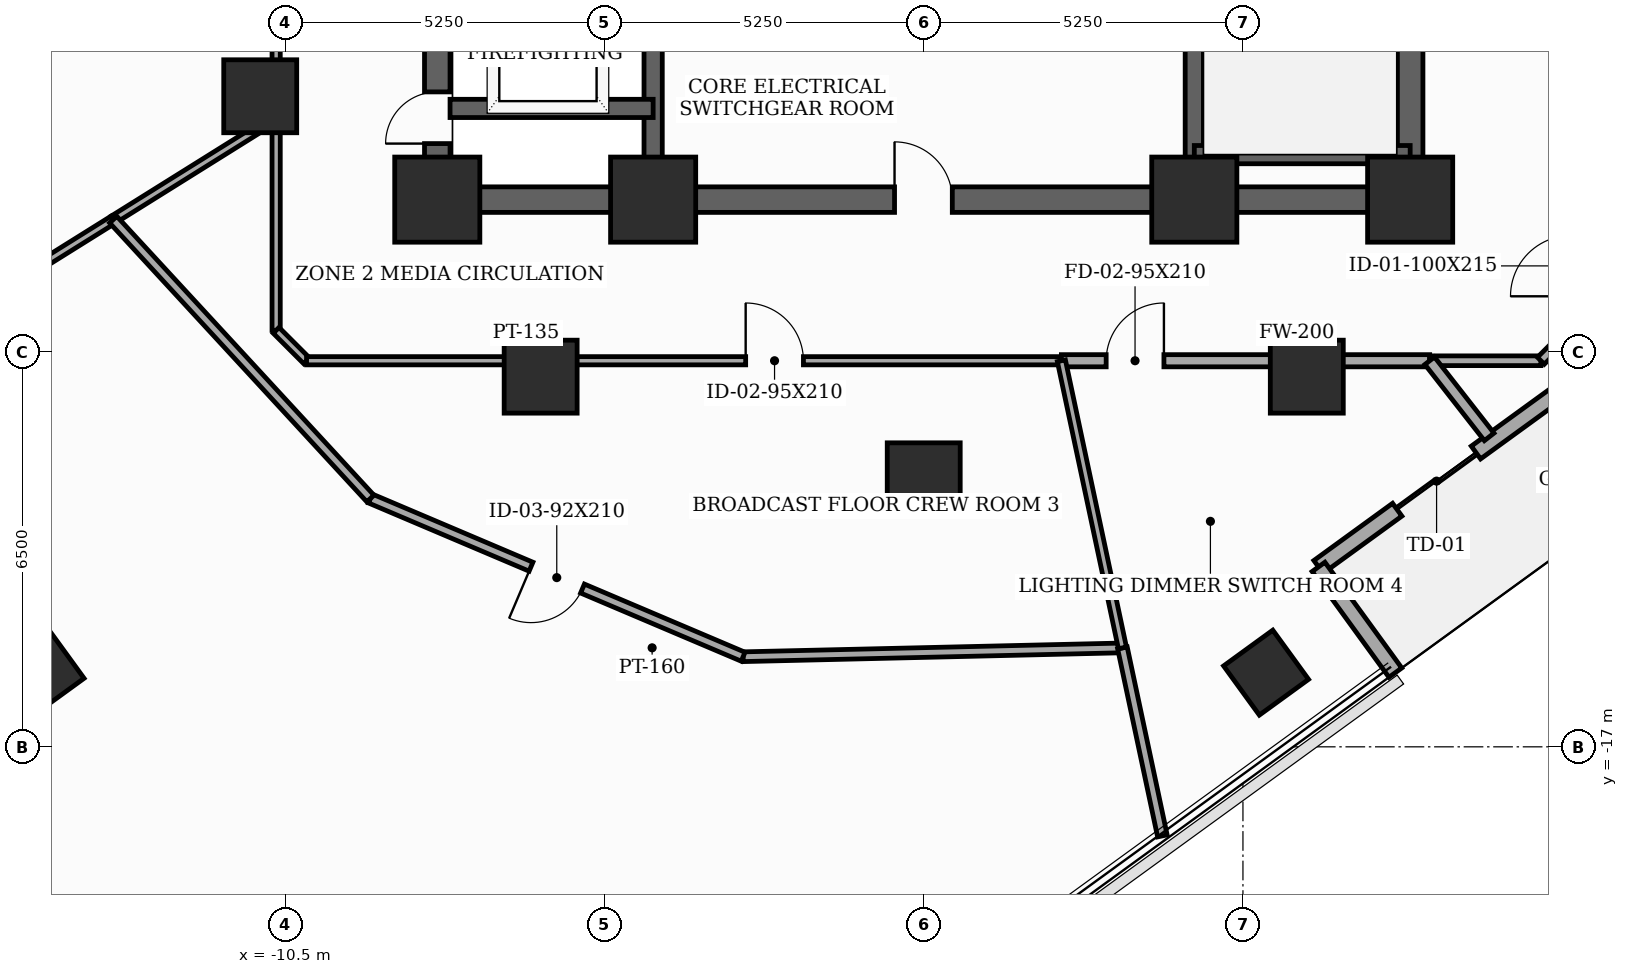
"""IFC4 building model, lengths in metres.
Left out: names, types, materials, properties, quantities, classifications, styles, units other than length and angle.
Written with IfcOpenShell. Run it as: python <this file> out.ifc"""

import sys

from ifc_helpers import new_model, si_unit, direction, frame, frame_2d, origin, origin_2d, place, context, subcontext, project, spatial, rectangle, extrude, element, fill, save


model = new_model("IFC4")
c1 = context("Model", 3, precision=1e-05, world=origin(), true_north=direction((0.0, 1.0)))
c2 = subcontext(c1, "Body", "Model", "MODEL_VIEW")
j1 = project(units=[si_unit("LENGTHUNIT", "METRE"), si_unit("PLANEANGLEUNIT", "RADIAN")], contexts=[c1])
p1 = place(None, origin())
s1 = spatial("IfcSite", under=j1, at=p1, CompositionType="ELEMENT")
p2 = place(p1, origin())
s2 = spatial("IfcBuilding", under=s1, at=p2, CompositionType="ELEMENT")
p3 = place(p2, frame((0.0, 0.0, 158.3)))
s3 = spatial("IfcBuildingStorey", under=s2, at=p3, CompositionType="ELEMENT", Elevation=158.3)
for number, where, z_axis, x_axis in (
    (1, (-8.0, -8.0, 0.0), (0.0, 0.0, 1.0), (1.0, 0.0, 0.0)),
    (2, (-4.45, -8.0, 0.0), (0.0, 0.0, 1.0), (1.0, 0.0, 0.0)),
    (3, (4.45, -8.0, 0.0), (0.0, 0.0, 1.0), (1.0, 0.0, 0.0)),
    (4, (8.0, -8.0, 0.0), (0.0, 0.0, 1.0), (1.0, 0.0, 0.0)),
):
    element("IfcColumn", number, at=place(p3, frame(where, z_axis=z_axis, x_axis=x_axis)), inside=s3, PredefinedType="COLUMN", context=c2, shape_type="SweptSolid", body=[
        extrude(rectangle(XDim=1.4, YDim=1.4, at=origin_2d()), origin(), (0.0, 0.0, 1.0), 3.7),
    ])
for number, where, z_axis, x_axis in (
    (5, (-10.912, -6.3, 0.0), (0.0, 0.0, 1.0), (1.0, 0.0, 0.0)),
    (6, (-6.3, -10.912, 0.0), (0.0, 0.0, 1.0), (1.0, 0.0, 0.0)),
    (7, (0.0, -12.6, 0.0), (0.0, 0.0, 1.0), (1.0, 0.0, 0.0)),
    (8, (6.3, -10.912, 0.0), (0.0, 0.0, 1.0), (1.0, 0.0, 0.0)),
):
    element("IfcColumn", number, at=place(p3, frame(where, z_axis=z_axis, x_axis=x_axis)), inside=s3, PredefinedType="COLUMN", context=c2, shape_type="SweptSolid", body=[
        extrude(rectangle(XDim=1.2, YDim=1.2, at=origin_2d()), origin(), (0.0, 0.0, 1.0), 3.7),
    ])
for number, where, z_axis, x_axis in (
    (9, (5.63, -15.78, 0.0), (0.0, 0.0, 1.0), (0.809, 0.588, 0.0)),
    (10, (-14.507, -15.763, 0.0), (0.0, 0.0, 1.0), (0.809, 0.588, 0.0)),
):
    element("IfcColumn", number, at=place(p3, frame(where, z_axis=z_axis, x_axis=x_axis)), inside=s3, PredefinedType="COLUMN", context=c2, shape_type="SweptSolid", body=[
        extrude(rectangle(XDim=1.0, YDim=1.0, at=origin_2d()), origin(), (0.0, 0.0, 1.0), 3.7),
    ])
p4 = place(p3, frame((6.493, -14.041, 0.0), z_axis=(0.0, 0.0, 1.0), x_axis=(0.80901166244, 0.587792591002, 0.0)))
e11 = element("IfcWall", 11, at=p4, inside=s3, PredefinedType="SOLIDWALL", context=c2, shape_type="SweptSolid", body=[
    extrude(rectangle(XDim=10.8, YDim=0.26, at=frame_2d((5.4, 0.0))), origin(), (0.0, 0.0, 1.0), 3.5),
])
p5 = place(p4, frame((1.6, 0.0, 0.0)))
e12 = element("IfcOpeningElement", 12, at=p5, cuts=e11, PredefinedType="OPENING", context=c2, shape_type="SweptSolid", body=[
    extrude(rectangle(XDim=1.6, YDim=2.08, at=frame_2d((0.8, 1.04))), frame((0.0, 0.14, 0.0), z_axis=(0.0, -1.0, 0.0), x_axis=(1.0, 0.0, 0.0)), (0.0, 0.0, 1.0), 0.28),
])
p6 = place(p4, frame((5.65, 0.0, 0.85)))
e13 = element("IfcOpeningElement", 13, at=p6, cuts=e11, PredefinedType="OPENING", context=c2, shape_type="SweptSolid", body=[
    extrude(rectangle(XDim=1.3, YDim=1.25, at=frame_2d((0.65, 0.625))), frame((0.0, 0.14, 0.0), z_axis=(0.0, -1.0, 0.0), x_axis=(1.0, 0.0, 0.0)), (0.0, 0.0, 1.0), 0.28),
])
p7 = place(p3, frame((7.757, -15.78, 0.0), z_axis=(0.0, 0.0, 1.0), x_axis=(-0.587739506477, 0.80905022868, 0.0)))
e14 = element("IfcWall", 14, at=p7, inside=s3, PredefinedType="SOLIDWALL", context=c2, shape_type="SweptSolid", body=[
    extrude(rectangle(XDim=2.15, YDim=0.26, at=frame_2d((1.075, 0.0))), origin(), (0.0, 0.0, 1.0), 3.5),
])
p8 = place(p3, frame((-8.0, -8.0, 0.0), z_axis=(0.0, 0.0, 1.0), x_axis=(0.0, 1.0, 0.0)))
e15 = element("IfcWall", 15, at=p8, inside=s3, PredefinedType="SHEAR", context=c2, shape_type="SweptSolid", body=[
    extrude(rectangle(XDim=16.0, YDim=0.42, at=frame_2d((8.0, 0.0))), origin(), (0.0, 0.0, 1.0), 3.5),
])
p9 = place(p8, frame((0.922, 0.0, 0.0)))
e16 = element("IfcOpeningElement", 16, at=p9, cuts=e15, PredefinedType="OPENING", context=c2, shape_type="SweptSolid", body=[
    extrude(rectangle(XDim=0.85, YDim=2.02, at=frame_2d((0.425, 1.01))), frame((0.0, 0.22, 0.0), z_axis=(0.0, -1.0, 0.0), x_axis=(1.0, 0.0, 0.0)), (0.0, 0.0, 1.0), 0.44),
])
p10 = place(p8, frame((5.35, 0.0, 0.0)))
e17 = element("IfcOpeningElement", 17, at=p10, cuts=e15, PredefinedType="OPENING", context=c2, shape_type="SweptSolid", body=[
    extrude(rectangle(XDim=1.05, YDim=2.15, at=frame_2d((0.525, 1.075))), frame((0.0, 0.22, 0.0), z_axis=(0.0, -1.0, 0.0), x_axis=(1.0, 0.0, 0.0)), (0.0, 0.0, 1.0), 0.44),
])
p11 = place(p3, frame((8.0, -8.0, 0.0), z_axis=(0.0, 0.0, 1.0), x_axis=(0.0, 1.0, 0.0)))
e18 = element("IfcWall", 18, at=p11, inside=s3, PredefinedType="SHEAR", context=c2, shape_type="SweptSolid", body=[
    extrude(rectangle(XDim=16.0, YDim=0.42, at=frame_2d((8.0, 0.0))), origin(), (0.0, 0.0, 1.0), 3.5),
])
p12 = place(p11, frame((9.6, 0.0, 0.0)))
e19 = element("IfcOpeningElement", 19, at=p12, cuts=e18, PredefinedType="OPENING", context=c2, shape_type="SweptSolid", body=[
    extrude(rectangle(XDim=1.05, YDim=2.15, at=frame_2d((0.525, 1.075))), frame((0.0, 0.22, 0.0), z_axis=(0.0, -1.0, 0.0), x_axis=(1.0, 0.0, 0.0)), (0.0, 0.0, 1.0), 0.44),
])
p13 = place(p11, frame((14.229, 0.0, 0.0)))
e20 = element("IfcOpeningElement", 20, at=p13, cuts=e18, PredefinedType="OPENING", context=c2, shape_type="SweptSolid", body=[
    extrude(rectangle(XDim=0.85, YDim=2.02, at=frame_2d((0.425, 1.01))), frame((0.0, 0.22, 0.0), z_axis=(0.0, -1.0, 0.0), x_axis=(1.0, 0.0, 0.0)), (0.0, 0.0, 1.0), 0.44),
])
p14 = place(p3, frame((-8.0, -8.0, 0.0), z_axis=(0.0, 0.0, 1.0), x_axis=(1.0, 0.0, 0.0)))
e21 = element("IfcWall", 21, at=p14, inside=s3, PredefinedType="SHEAR", context=c2, shape_type="SweptSolid", body=[
    extrude(rectangle(XDim=16.0, YDim=0.42, at=frame_2d((8.0, 0.0))), origin(), (0.0, 0.0, 1.0), 3.5),
])
p15 = place(p14, frame((7.52, 0.0, 0.0)))
e22 = element("IfcOpeningElement", 22, at=p15, cuts=e21, PredefinedType="OPENING", context=c2, shape_type="SweptSolid", body=[
    extrude(rectangle(XDim=0.95, YDim=2.1, at=frame_2d((0.475, 1.05))), frame((0.0, 0.22, 0.0), z_axis=(0.0, -1.0, 0.0), x_axis=(1.0, 0.0, 0.0)), (0.0, 0.0, 1.0), 0.44),
])
for number, where, z_axis, x_axis in (
    (23, (-4.45, -7.79, 0.0), (0.0, 0.0, 1.0), (0.0, 1.0, 0.0)),
    (24, (4.45, -7.79, 0.0), (0.0, 0.0, 1.0), (0.0, 1.0, 0.0)),
):
    element("IfcWall", number, at=place(p3, frame(where, z_axis=z_axis, x_axis=x_axis)), inside=s3, PredefinedType="SHEAR", context=c2, shape_type="SweptSolid", body=[
        extrude(rectangle(XDim=15.58, YDim=0.3, at=frame_2d((7.79, 0.0))), origin(), (0.0, 0.0, 1.0), 3.5),
    ])
p16 = place(p3, frame((4.45, -7.26, 0.0), z_axis=(0.0, 0.0, 1.0), x_axis=(1.0, 0.0, 0.0)))
e25 = element("IfcWall", 25, at=p16, inside=s3, PredefinedType="SHEAR", context=c2, shape_type="SweptSolid", body=[
    extrude(rectangle(XDim=3.55, YDim=0.3, at=frame_2d((1.775, 0.0))), origin(), (0.0, 0.0, 1.0), 3.5),
])
p17 = place(p3, frame((-7.79, -6.5, 0.0), z_axis=(0.0, 0.0, 1.0), x_axis=(1.0, 0.0, 0.0)))
e26 = element("IfcWall", 26, at=p17, inside=s3, PredefinedType="SHEAR", context=c2, shape_type="SweptSolid", body=[
    extrude(rectangle(XDim=3.34, YDim=0.3, at=frame_2d((1.67, 0.0))), origin(), (0.0, 0.0, 1.0), 3.5),
])
p18 = place(p3, frame((-10.65, 4.742, 0.0), z_axis=(0.0, 0.0, 1.0), x_axis=(0.0, -1.0, 0.0)))
e27 = element("IfcWall", 27, at=p18, inside=s3, PredefinedType="PARTITIONING", context=c2, shape_type="SweptSolid", body=[
    extrude(rectangle(XDim=11.397, YDim=0.135, at=frame_2d((5.698, 0.0))), origin(), (0.0, 0.0, 1.0), 2.885),
])
p19 = place(p18, frame((6.591, 0.0, 0.0)))
e28 = element("IfcOpeningElement", 28, at=p19, cuts=e27, PredefinedType="OPENING", context=c2, shape_type="SweptSolid", body=[
    extrude(rectangle(XDim=0.95, YDim=2.1, at=frame_2d((0.475, 1.05))), frame((0.0, 0.077, 0.0), z_axis=(0.0, -1.0, 0.0), x_axis=(1.0, 0.0, 0.0)), (0.0, 0.0, 1.0), 0.155),
])
p20 = place(p3, frame((-10.65, -6.655, 0.0), z_axis=(0.0, 0.0, 1.0), x_axis=(0.0, -1.0, 0.0)))
e29 = element("IfcWall", 29, at=p20, inside=s3, PredefinedType="PARTITIONING", context=c2, shape_type="SweptSolid", body=[
    extrude(rectangle(XDim=3.495, YDim=0.135, at=frame_2d((1.748, 0.0))), origin(), (0.0, 0.0, 1.0), 2.885),
])
p21 = place(p3, frame((-10.65, -10.15, 0.0), z_axis=(0.0, 0.0, 1.0), x_axis=(0.707106781187, -0.707106781187, 0.0)))
e30 = element("IfcWall", 30, at=p21, inside=s3, PredefinedType="PARTITIONING", context=c2, shape_type="SweptSolid", body=[
    extrude(rectangle(XDim=0.707, YDim=0.135, at=frame_2d((0.354, 0.0))), origin(), (0.0, 0.0, 1.0), 3.5),
])
p22 = place(p3, frame((-10.15, -10.65, 0.0), z_axis=(0.0, 0.0, 1.0), x_axis=(1.0, 0.0, 0.0)))
e31 = element("IfcWall", 31, at=p22, inside=s3, PredefinedType="PARTITIONING", context=c2, shape_type="SweptSolid", body=[
    extrude(rectangle(XDim=12.414, YDim=0.135, at=frame_2d((6.207, 0.0))), origin(), (0.0, 0.0, 1.0), 2.885),
])
p23 = place(p22, frame((7.222, 0.0, 0.0)))
e32 = element("IfcOpeningElement", 32, at=p23, cuts=e31, PredefinedType="OPENING", context=c2, shape_type="SweptSolid", body=[
    extrude(rectangle(XDim=0.95, YDim=2.1, at=frame_2d((0.475, 1.05))), frame((0.0, 0.077, 0.0), z_axis=(0.0, -1.0, 0.0), x_axis=(1.0, 0.0, 0.0)), (0.0, 0.0, 1.0), 0.155),
])
p24 = place(p3, frame((2.264, -10.65, 0.0), z_axis=(0.0, 0.0, 1.0), x_axis=(1.0, 0.0, 0.0)))
e33 = element("IfcWall", 33, at=p24, inside=s3, PredefinedType="SOLIDWALL", context=c2, shape_type="SweptSolid", body=[
    extrude(rectangle(XDim=6.057, YDim=0.2, at=frame_2d((3.029, 0.0))), origin(), (0.0, 0.0, 1.0), 2.885),
])
p25 = place(p24, frame((0.736, 0.0, 0.0)))
e34 = element("IfcOpeningElement", 34, at=p25, cuts=e33, PredefinedType="OPENING", context=c2, shape_type="SweptSolid", body=[
    extrude(rectangle(XDim=0.95, YDim=2.1, at=frame_2d((0.475, 1.05))), frame((0.0, 0.11, 0.0), z_axis=(0.0, -1.0, 0.0), x_axis=(1.0, 0.0, 0.0)), (0.0, 0.0, 1.0), 0.22),
])
p26 = place(p3, frame((8.321, -10.65, 0.0), z_axis=(0.0, 0.0, 1.0), x_axis=(1.0, 0.0, 0.0)))
e35 = element("IfcWall", 35, at=p26, inside=s3, PredefinedType="PARTITIONING", context=c2, shape_type="SweptSolid", body=[
    extrude(rectangle(XDim=1.829, YDim=0.16, at=frame_2d((0.915, 0.0))), origin(), (0.0, 0.0, 1.0), 3.5),
])
p27 = place(p3, frame((10.15, -10.65, 0.0), z_axis=(0.0, 0.0, 1.0), x_axis=(0.707106781187, 0.707106781187, 0.0)))
e36 = element("IfcWall", 36, at=p27, inside=s3, PredefinedType="PARTITIONING", context=c2, shape_type="SweptSolid", body=[
    extrude(rectangle(XDim=0.707, YDim=0.16, at=frame_2d((0.354, 0.0))), origin(), (0.0, 0.0, 1.0), 3.5),
])
p28 = place(p3, frame((-16.272, -10.167, 0.0), z_axis=(0.0, 0.0, 1.0), x_axis=(0.848097115085, 0.529840809474, 0.0)))
e37 = element("IfcWall", 37, at=p28, inside=s3, PredefinedType="PARTITIONING", context=c2, shape_type="SweptSolid", body=[
    extrude(rectangle(XDim=3.47, YDim=0.135, at=frame_2d((1.735, 0.0))), origin(), (0.0, 0.0, 1.0), 2.985),
])
p29 = place(p3, frame((-13.329, -8.329, 0.0), z_axis=(0.0, 0.0, 1.0), x_axis=(0.848059079617, 0.529901686617, 0.0)))
e38 = element("IfcWall", 38, at=p29, inside=s3, PredefinedType="PARTITIONING", context=c2, shape_type="SweptSolid", body=[
    extrude(rectangle(XDim=3.159, YDim=0.135, at=frame_2d((1.58, 0.0))), origin(), (0.0, 0.0, 1.0), 2.885),
])
p30 = place(p3, frame((3.268, -15.373, 0.0), z_axis=(0.0, 0.0, 1.0), x_axis=(-0.99972988351, -0.023241342836, 0.0)))
e39 = element("IfcWall", 39, at=p30, inside=s3, PredefinedType="PARTITIONING", context=c2, shape_type="SweptSolid", body=[
    extrude(rectangle(XDim=6.24, YDim=0.16, at=frame_2d((3.12, 0.0))), origin(), (0.0, 0.0, 1.0), 2.885),
])
p31 = place(p3, frame((-2.97, -15.518, 0.0), z_axis=(0.0, 0.0, 1.0), x_axis=(-0.920506675175, 0.390726836752, 0.0)))
e40 = element("IfcWall", 40, at=p31, inside=s3, PredefinedType="PARTITIONING", context=c2, shape_type="SweptSolid", body=[
    extrude(rectangle(XDim=6.659, YDim=0.16, at=frame_2d((3.33, 0.0))), origin(), (0.0, 0.0, 1.0), 3.5),
])
p32 = place(p31, frame((2.87, 0.0, 0.0)))
e41 = element("IfcOpeningElement", 41, at=p32, cuts=e40, PredefinedType="OPENING", context=c2, shape_type="SweptSolid", body=[
    extrude(rectangle(XDim=0.92, YDim=2.1, at=frame_2d((0.46, 1.05))), frame((0.0, 0.09, 0.0), z_axis=(0.0, -1.0, 0.0), x_axis=(1.0, 0.0, 0.0)), (0.0, 0.0, 1.0), 0.18),
])
p33 = place(p3, frame((-9.1, -12.916, 0.0), z_axis=(0.0, 0.0, 1.0), x_axis=(-0.677841155448, 0.735208384052, 0.0)))
e42 = element("IfcWall", 42, at=p33, inside=s3, PredefinedType="PARTITIONING", context=c2, shape_type="SweptSolid", body=[
    extrude(rectangle(XDim=6.239, YDim=0.16, at=frame_2d((3.12, 0.0))), origin(), (0.0, 0.0, 1.0), 2.885),
])
p34 = place(p3, frame((3.925, -18.465, 0.0), z_axis=(0.0, 0.0, 1.0), x_axis=(-0.207851365584, 0.978160421314, 0.0)))
e43 = element("IfcWall", 43, at=p34, inside=s3, PredefinedType="PARTITIONING", context=c2, shape_type="SweptSolid", body=[
    extrude(rectangle(XDim=3.161, YDim=0.16, at=frame_2d((1.581, 0.0))), origin(), (0.0, 0.0, 1.0), 2.985),
])
p35 = place(p3, frame((3.268, -15.373, 0.0), z_axis=(0.0, 0.0, 1.0), x_axis=(-0.207954296991, 0.978138543542, 0.0)))
e44 = element("IfcWall", 44, at=p35, inside=s3, PredefinedType="PARTITIONING", context=c2, shape_type="SweptSolid", body=[
    extrude(rectangle(XDim=4.829, YDim=0.135, at=frame_2d((2.414, 0.0))), origin(), (0.0, 0.0, 1.0), 2.885),
])
p36 = place(p3, frame((9.3, -11.903, 0.0), z_axis=(0.0, 0.0, 1.0), x_axis=(-0.615587410594, 0.788068613712, 0.0)))
e45 = element("IfcWall", 45, at=p36, inside=s3, PredefinedType="SOLIDWALL", context=c2, shape_type="SweptSolid", body=[
    extrude(rectangle(XDim=1.59, YDim=0.2, at=frame_2d((0.795, 0.0))), origin(), (0.0, 0.0, 1.0), 3.5),
])
p37 = place(p5, frame((1.6, 0.0, 0.0), z_axis=(0.0, 0.0, 1.0), x_axis=(-1.0, 0.0, 0.0)))
e46 = element("IfcDoor", 46, at=p37, inside=s3, OperationType="DOUBLE_DOOR_SLIDING", PredefinedType="DOOR", context=c2, shape_type="SweptSolid", body=[
    extrude(rectangle(XDim=1.6, YDim=2.08, at=frame_2d((0.8, 1.04))), frame((0.0, 0.025, 0.0), z_axis=(0.0, -1.0, 0.0), x_axis=(1.0, 0.0, 0.0)), (0.0, 0.0, 1.0), 0.05),
])
fill(e12, e46)
p38 = place(p9, origin())
e47 = element("IfcDoor", 47, at=p38, inside=s3, OperationType="SINGLE_SWING_LEFT", PredefinedType="TRAPDOOR", context=c2, shape_type="SweptSolid", body=[
    extrude(rectangle(XDim=0.85, YDim=2.02, at=frame_2d((0.425, 1.01))), frame((0.0, 0.025, 0.0), z_axis=(0.0, -1.0, 0.0), x_axis=(1.0, 0.0, 0.0)), (0.0, 0.0, 1.0), 0.05),
])
fill(e16, e47)
p39 = place(p15, origin())
e48 = element("IfcDoor", 48, at=p39, inside=s3, OperationType="SINGLE_SWING_LEFT", PredefinedType="DOOR", context=c2, shape_type="SweptSolid", body=[
    extrude(rectangle(XDim=0.95, YDim=2.1, at=frame_2d((0.475, 1.05))), frame((0.0, 0.025, 0.0), z_axis=(0.0, -1.0, 0.0), x_axis=(1.0, 0.0, 0.0)), (0.0, 0.0, 1.0), 0.05),
])
fill(e22, e48)
p40 = place(p23, origin())
e49 = element("IfcDoor", 49, at=p40, inside=s3, OperationType="SINGLE_SWING_LEFT", PredefinedType="DOOR", context=c2, shape_type="SweptSolid", body=[
    extrude(rectangle(XDim=0.95, YDim=2.1, at=frame_2d((0.475, 1.05))), frame((0.0, 0.025, 0.0), z_axis=(0.0, -1.0, 0.0), x_axis=(1.0, 0.0, 0.0)), (0.0, 0.0, 1.0), 0.05),
])
fill(e32, e49)
p41 = place(p25, origin())
e50 = element("IfcDoor", 50, at=p41, inside=s3, OperationType="SINGLE_SWING_RIGHT", PredefinedType="DOOR", context=c2, shape_type="SweptSolid", body=[
    extrude(rectangle(XDim=0.95, YDim=2.1, at=frame_2d((0.475, 1.05))), frame((0.0, 0.025, 0.0), z_axis=(0.0, -1.0, 0.0), x_axis=(1.0, 0.0, 0.0)), (0.0, 0.0, 1.0), 0.05),
])
fill(e34, e50)
p42 = place(p32, origin())
e51 = element("IfcDoor", 51, at=p42, inside=s3, OperationType="SINGLE_SWING_RIGHT", PredefinedType="DOOR", context=c2, shape_type="SweptSolid", body=[
    extrude(rectangle(XDim=0.92, YDim=2.1, at=frame_2d((0.46, 1.05))), frame((0.0, 0.025, 0.0), z_axis=(0.0, -1.0, 0.0), x_axis=(1.0, 0.0, 0.0)), (0.0, 0.0, 1.0), 0.05),
])
fill(e41, e51)
save(model, sys.argv[1])
